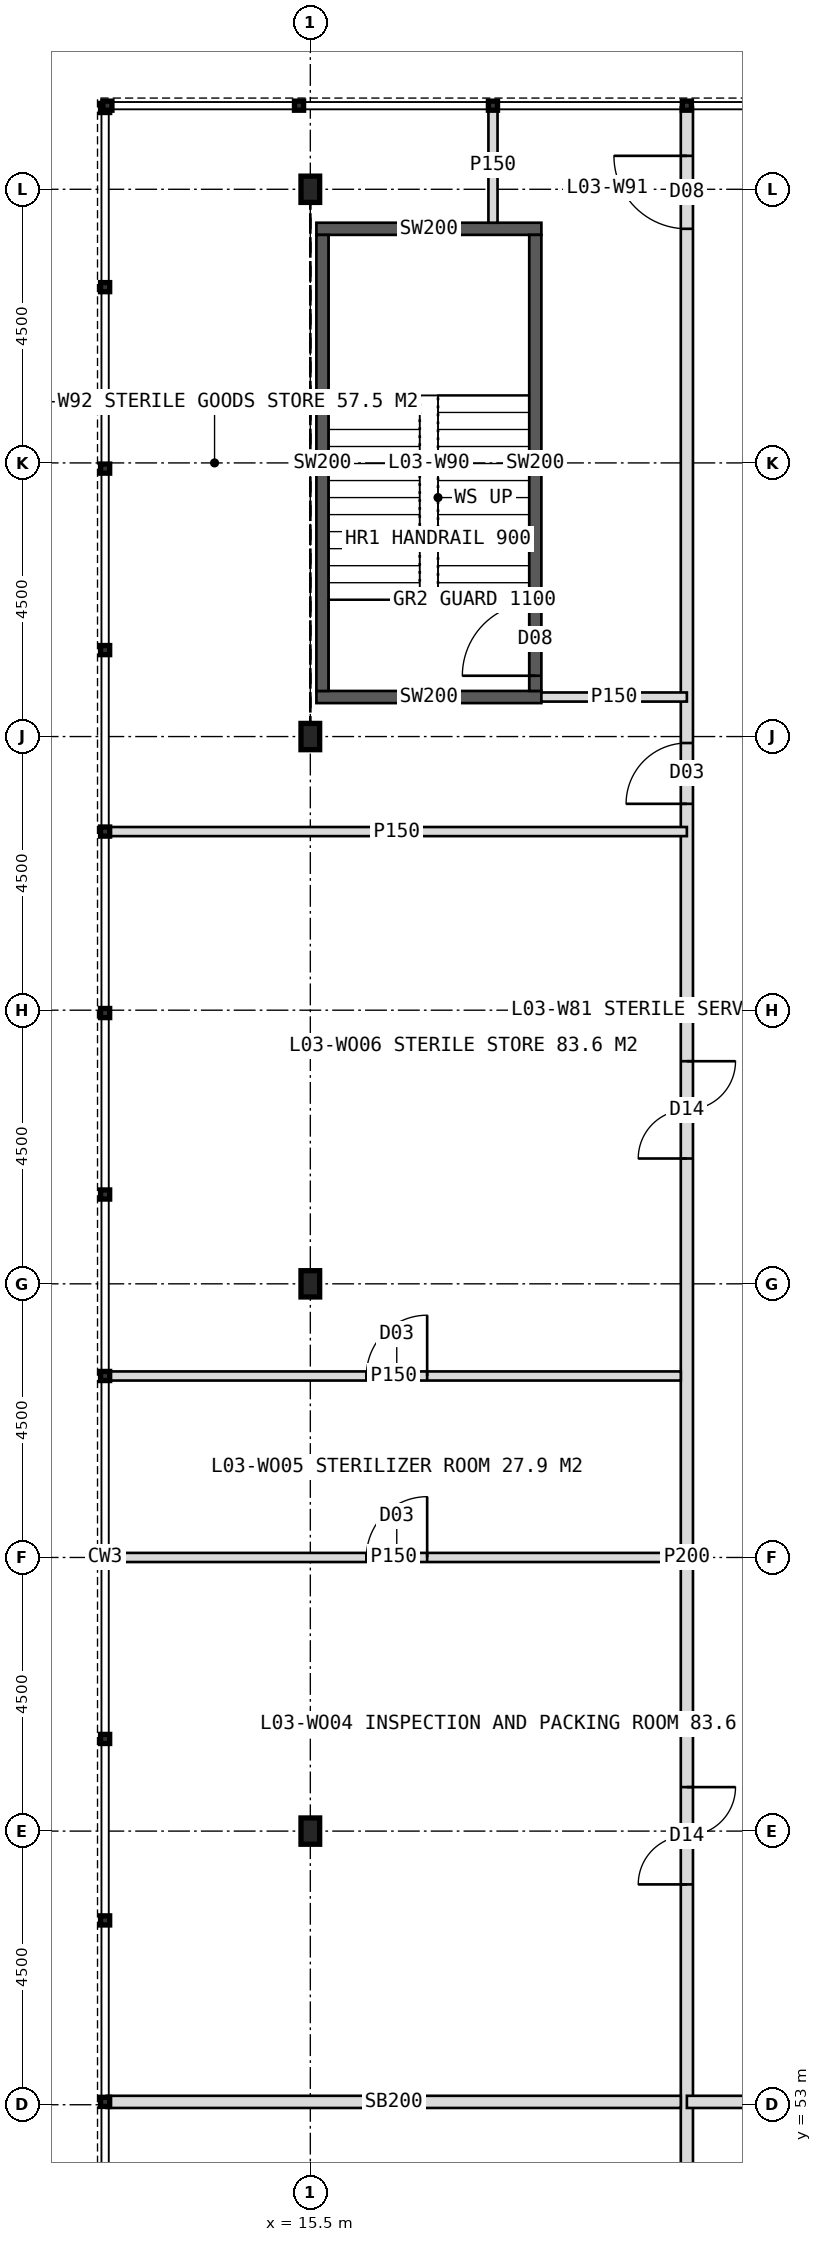
"""IFC4 building model, lengths in metres.
Left out: names, types, materials, properties, quantities, classifications, styles, units other than length and angle.
Written with IfcOpenShell. Run it as: python <this file> out.ifc"""

import sys

from ifc_helpers import new_model, si_unit, direction, frame, frame_2d, origin, origin_2d, place, context, subcontext, project, spatial, rectangle, i_section, extrude, element, fill, save


model = new_model("IFC4")
c1 = context("Model", 3, precision=1e-05, world=origin(), true_north=direction((0.0, 1.0)))
c2 = subcontext(c1, "Body", "Model", "MODEL_VIEW")
j1 = project(units=[si_unit("LENGTHUNIT", "METRE"), si_unit("PLANEANGLEUNIT", "RADIAN")], contexts=[c1])
p1 = place(None, origin())
s1 = spatial("IfcSite", under=j1, at=p1, CompositionType="ELEMENT")
p2 = place(p1, origin())
s2 = spatial("IfcBuilding", under=s1, at=p2, CompositionType="ELEMENT")
p3 = place(p2, frame((0.0, 0.0, 16.5)))
s3 = spatial("IfcBuildingStorey", under=s2, at=p3, CompositionType="ELEMENT", Elevation=16.5)
for number, where, z_axis, x_axis in (
    (1, (15.5, 57.5, 0.0), (0.0, 0.0, 1.0), (1.0, 0.0, 0.0)),
    (2, (15.5, 66.5, 0.0), (0.0, 0.0, 1.0), (1.0, 0.0, 0.0)),
    (3, (15.5, 75.5, 0.0), (0.0, 0.0, 1.0), (1.0, 0.0, 0.0)),
    (4, (15.5, 84.5, 0.0), (0.0, 0.0, 1.0), (1.0, 0.0, 0.0)),
):
    element("IfcColumn", number, at=place(p3, frame(where, z_axis=z_axis, x_axis=x_axis)), inside=s3, PredefinedType="COLUMN", context=c2, shape_type="SweptSolid", body=[
        extrude(i_section(OverallWidth=0.307, OverallDepth=0.432, WebThickness=0.021, FlangeThickness=0.04, FilletRadius=0.027, at=origin_2d()), origin(), (0.0, 0.0, 1.0), 4.5),
    ])
p4 = place(p3, frame((21.693, 38.15, 0.0), z_axis=(0.0, 0.0, 1.0), x_axis=(0.0, 1.0, 0.0)))
e5 = element("IfcWall", 5, at=p4, inside=s3, PredefinedType="PARTITIONING", context=c2, shape_type="SweptSolid", body=[
    extrude(rectangle(XDim=47.7, YDim=0.2, at=frame_2d((23.85, 0.0))), origin(), (0.0, 0.0, 1.0), 4.2),
])
p5 = place(p4, frame((45.7, 0.0, 0.0)))
e6 = element("IfcOpeningElement", 6, at=p5, cuts=e5, PredefinedType="OPENING", context=c2, shape_type="SweptSolid", body=[
    extrude(rectangle(XDim=1.2, YDim=2.1, at=frame_2d((0.6, 1.05))), frame((0.0, 0.11, 0.0), z_axis=(0.0, -1.0, 0.0), x_axis=(1.0, 0.0, 0.0)), (0.0, 0.0, 1.0), 0.22),
])
p6 = place(p4, frame((36.244, 0.0, 0.0)))
e7 = element("IfcOpeningElement", 7, at=p6, cuts=e5, PredefinedType="OPENING", context=c2, shape_type="SweptSolid", body=[
    extrude(rectangle(XDim=1.0, YDim=2.1, at=frame_2d((0.5, 1.05))), frame((0.0, 0.11, 0.0), z_axis=(0.0, -1.0, 0.0), x_axis=(1.0, 0.0, 0.0)), (0.0, 0.0, 1.0), 0.22),
])
p7 = place(p4, frame((2.122, 0.0, 0.0)))
e8 = element("IfcOpeningElement", 8, at=p7, cuts=e5, PredefinedType="OPENING", context=c2, shape_type="SweptSolid", body=[
    extrude(rectangle(XDim=1.6, YDim=2.2, at=frame_2d((0.8, 1.1))), frame((0.0, 0.11, 0.0), z_axis=(0.0, -1.0, 0.0), x_axis=(1.0, 0.0, 0.0)), (0.0, 0.0, 1.0), 0.22),
])
p8 = place(p4, frame((8.328, 0.0, 0.0)))
e9 = element("IfcOpeningElement", 9, at=p8, cuts=e5, PredefinedType="OPENING", context=c2, shape_type="SweptSolid", body=[
    extrude(rectangle(XDim=1.0, YDim=2.1, at=frame_2d((0.5, 1.05))), frame((0.0, 0.11, 0.0), z_axis=(0.0, -1.0, 0.0), x_axis=(1.0, 0.0, 0.0)), (0.0, 0.0, 1.0), 0.22),
])
p9 = place(p4, frame((18.473, 0.0, 0.0)))
e10 = element("IfcOpeningElement", 10, at=p9, cuts=e5, PredefinedType="OPENING", context=c2, shape_type="SweptSolid", body=[
    extrude(rectangle(XDim=1.6, YDim=2.2, at=frame_2d((0.8, 1.1))), frame((0.0, 0.11, 0.0), z_axis=(0.0, -1.0, 0.0), x_axis=(1.0, 0.0, 0.0)), (0.0, 0.0, 1.0), 0.22),
])
p10 = place(p4, frame((30.411, 0.0, 0.0)))
e11 = element("IfcOpeningElement", 11, at=p10, cuts=e5, PredefinedType="OPENING", context=c2, shape_type="SweptSolid", body=[
    extrude(rectangle(XDim=1.6, YDim=2.2, at=frame_2d((0.8, 1.1))), frame((0.0, 0.11, 0.0), z_axis=(0.0, -1.0, 0.0), x_axis=(1.0, 0.0, 0.0)), (0.0, 0.0, 1.0), 0.22),
])
p11 = place(p3, frame((21.693, 53.047, 0.0), z_axis=(0.0, 0.0, 1.0), x_axis=(1.0, 0.0, 0.0)))
e12 = element("IfcWall", 12, at=p11, inside=s3, PredefinedType="SOLIDWALL", context=c2, shape_type="SweptSolid", body=[
    extrude(rectangle(XDim=3.189, YDim=0.2, at=frame_2d((1.594, 0.0))), origin(), (0.0, 0.0, 1.0), 4.2),
])
for number, where, z_axis, x_axis in (
    (13, (15.6, 76.15, 0.0), (0.0, 0.0, 1.0), (1.0, 0.0, 0.0)),
    (14, (15.6, 83.85, 0.0), (0.0, 0.0, 1.0), (1.0, 0.0, 0.0)),
):
    element("IfcWall", number, at=place(p3, frame(where, z_axis=z_axis, x_axis=x_axis)), inside=s3, PredefinedType="SOLIDWALL", context=c2, shape_type="SweptSolid", body=[
        extrude(rectangle(XDim=3.7, YDim=0.2, at=frame_2d((1.85, 0.0))), origin(), (0.0, 0.0, 1.0), 4.2),
    ])
p12 = place(p3, frame((15.7, 76.25, 0.0), z_axis=(0.0, 0.0, 1.0), x_axis=(0.0, 1.0, 0.0)))
e15 = element("IfcWall", 15, at=p12, inside=s3, PredefinedType="SOLIDWALL", context=c2, shape_type="SweptSolid", body=[
    extrude(rectangle(XDim=7.5, YDim=0.2, at=frame_2d((3.75, 0.0))), origin(), (0.0, 0.0, 1.0), 4.2),
])
p13 = place(p3, frame((19.2, 76.25, 0.0), z_axis=(0.0, 0.0, 1.0), x_axis=(0.0, 1.0, 0.0)))
e16 = element("IfcWall", 16, at=p13, inside=s3, PredefinedType="SOLIDWALL", context=c2, shape_type="SweptSolid", body=[
    extrude(rectangle(XDim=7.5, YDim=0.2, at=frame_2d((3.75, 0.0))), origin(), (0.0, 0.0, 1.0), 4.2),
])
p14 = place(p13, frame((0.25, 0.0, 0.0)))
e17 = element("IfcOpeningElement", 17, at=p14, cuts=e16, PredefinedType="OPENING", context=c2, shape_type="SweptSolid", body=[
    extrude(rectangle(XDim=1.2, YDim=2.1, at=frame_2d((0.6, 1.05))), frame((0.0, 0.11, 0.0), z_axis=(0.0, -1.0, 0.0), x_axis=(1.0, 0.0, 0.0)), (0.0, 0.0, 1.0), 0.22),
])
p15 = place(p3, frame((19.3, 76.15, 0.0), z_axis=(0.0, 0.0, 1.0), x_axis=(1.0, 0.0, 0.0)))
e18 = element("IfcWall", 18, at=p15, inside=s3, PredefinedType="PARTITIONING", context=c2, shape_type="SweptSolid", body=[
    extrude(rectangle(XDim=2.393, YDim=0.15, at=frame_2d((1.197, 0.0))), origin(), (0.0, 0.0, 1.0), 4.2),
])
p16 = place(p3, frame((18.504, 83.95, 0.0), z_axis=(0.0, 0.0, 1.0), x_axis=(0.0, 1.0, 0.0)))
e19 = element("IfcWall", 19, at=p16, inside=s3, PredefinedType="PARTITIONING", context=c2, shape_type="SweptSolid", body=[
    extrude(rectangle(XDim=1.9, YDim=0.15, at=frame_2d((0.95, 0.0))), origin(), (0.0, 0.0, 1.0), 4.2),
])
p17 = place(p3, frame((12.15, 73.938, 0.0), z_axis=(0.0, 0.0, 1.0), x_axis=(1.0, 0.0, 0.0)))
e20 = element("IfcWall", 20, at=p17, inside=s3, PredefinedType="PARTITIONING", context=c2, shape_type="SweptSolid", body=[
    extrude(rectangle(XDim=9.543, YDim=0.15, at=frame_2d((4.771, 0.0))), origin(), (0.0, 0.0, 1.0), 4.2),
])
p18 = place(p3, frame((12.15, 53.047, 0.0), z_axis=(0.0, 0.0, 1.0), x_axis=(1.0, 0.0, 0.0)))
e21 = element("IfcWall", 21, at=p18, inside=s3, PredefinedType="SOLIDWALL", context=c2, shape_type="SweptSolid", body=[
    extrude(rectangle(XDim=9.443, YDim=0.2, at=frame_2d((4.722, 0.0))), origin(), (0.0, 0.0, 1.0), 4.2),
])
p19 = place(p3, frame((12.15, 62.0, 0.0), z_axis=(0.0, 0.0, 1.0), x_axis=(1.0, 0.0, 0.0)))
e22 = element("IfcWall", 22, at=p19, inside=s3, PredefinedType="PARTITIONING", context=c2, shape_type="SweptSolid", body=[
    extrude(rectangle(XDim=9.443, YDim=0.15, at=frame_2d((4.722, 0.0))), origin(), (0.0, 0.0, 1.0), 4.2),
])
p20 = place(p19, frame((4.271, 0.0, 0.0)))
e23 = element("IfcOpeningElement", 23, at=p20, cuts=e22, PredefinedType="OPENING", context=c2, shape_type="SweptSolid", body=[
    extrude(rectangle(XDim=1.0, YDim=2.1, at=frame_2d((0.5, 1.05))), frame((0.0, 0.085, 0.0), z_axis=(0.0, -1.0, 0.0), x_axis=(1.0, 0.0, 0.0)), (0.0, 0.0, 1.0), 0.17),
])
p21 = place(p3, frame((12.15, 64.984, 0.0), z_axis=(0.0, 0.0, 1.0), x_axis=(1.0, 0.0, 0.0)))
e24 = element("IfcWall", 24, at=p21, inside=s3, PredefinedType="PARTITIONING", context=c2, shape_type="SweptSolid", body=[
    extrude(rectangle(XDim=9.443, YDim=0.15, at=frame_2d((4.722, 0.0))), origin(), (0.0, 0.0, 1.0), 4.2),
])
p22 = place(p21, frame((4.271, 0.0, 0.0)))
e25 = element("IfcOpeningElement", 25, at=p22, cuts=e24, PredefinedType="OPENING", context=c2, shape_type="SweptSolid", body=[
    extrude(rectangle(XDim=1.0, YDim=2.1, at=frame_2d((0.5, 1.05))), frame((0.0, 0.085, 0.0), z_axis=(0.0, -1.0, 0.0), x_axis=(1.0, 0.0, 0.0)), (0.0, 0.0, 1.0), 0.17),
])
p23 = place(p14, origin())
e26 = element("IfcDoor", 26, at=p23, inside=s3, OperationType="SINGLE_SWING_LEFT", PredefinedType="DOOR", context=c2, shape_type="SweptSolid", body=[
    extrude(rectangle(XDim=1.2, YDim=2.1, at=frame_2d((0.6, 1.05))), frame((0.0, 0.025, 0.0), z_axis=(0.0, -1.0, 0.0), x_axis=(1.0, 0.0, 0.0)), (0.0, 0.0, 1.0), 0.05),
])
fill(e17, e26)
p24 = place(p5, origin())
e27 = element("IfcDoor", 27, at=p24, inside=s3, OperationType="SINGLE_SWING_RIGHT", PredefinedType="DOOR", context=c2, shape_type="SweptSolid", body=[
    extrude(rectangle(XDim=1.2, YDim=2.1, at=frame_2d((0.6, 1.05))), frame((0.0, 0.025, 0.0), z_axis=(0.0, -1.0, 0.0), x_axis=(1.0, 0.0, 0.0)), (0.0, 0.0, 1.0), 0.05),
])
fill(e6, e27)
p25 = place(p6, origin())
e28 = element("IfcDoor", 28, at=p25, inside=s3, OperationType="SINGLE_SWING_LEFT", PredefinedType="DOOR", context=c2, shape_type="SweptSolid", body=[
    extrude(rectangle(XDim=1.0, YDim=2.1, at=frame_2d((0.5, 1.05))), frame((0.0, 0.025, 0.0), z_axis=(0.0, -1.0, 0.0), x_axis=(1.0, 0.0, 0.0)), (0.0, 0.0, 1.0), 0.05),
])
fill(e7, e28)
p26 = place(p9, origin())
e29 = element("IfcDoor", 29, at=p26, inside=s3, OperationType="DOUBLE_DOOR_DOUBLE_SWING", PredefinedType="DOOR", context=c2, shape_type="SweptSolid", body=[
    extrude(rectangle(XDim=1.6, YDim=2.2, at=frame_2d((0.8, 1.1))), frame((0.0, 0.025, 0.0), z_axis=(0.0, -1.0, 0.0), x_axis=(1.0, 0.0, 0.0)), (0.0, 0.0, 1.0), 0.05),
])
fill(e10, e29)
p27 = place(p20, origin())
e30 = element("IfcDoor", 30, at=p27, inside=s3, OperationType="SINGLE_SWING_RIGHT", PredefinedType="DOOR", context=c2, shape_type="SweptSolid", body=[
    extrude(rectangle(XDim=1.0, YDim=2.1, at=frame_2d((0.5, 1.05))), frame((0.0, 0.025, 0.0), z_axis=(0.0, -1.0, 0.0), x_axis=(1.0, 0.0, 0.0)), (0.0, 0.0, 1.0), 0.05),
])
fill(e23, e30)
p28 = place(p10, origin())
e31 = element("IfcDoor", 31, at=p28, inside=s3, OperationType="DOUBLE_DOOR_DOUBLE_SWING", PredefinedType="DOOR", context=c2, shape_type="SweptSolid", body=[
    extrude(rectangle(XDim=1.6, YDim=2.2, at=frame_2d((0.8, 1.1))), frame((0.0, 0.025, 0.0), z_axis=(0.0, -1.0, 0.0), x_axis=(1.0, 0.0, 0.0)), (0.0, 0.0, 1.0), 0.05),
])
fill(e11, e31)
p29 = place(p22, origin())
e32 = element("IfcDoor", 32, at=p29, inside=s3, OperationType="SINGLE_SWING_RIGHT", PredefinedType="DOOR", context=c2, shape_type="SweptSolid", body=[
    extrude(rectangle(XDim=1.0, YDim=2.1, at=frame_2d((0.5, 1.05))), frame((0.0, 0.025, 0.0), z_axis=(0.0, -1.0, 0.0), x_axis=(1.0, 0.0, 0.0)), (0.0, 0.0, 1.0), 0.05),
])
fill(e25, e32)
save(model, sys.argv[1])
